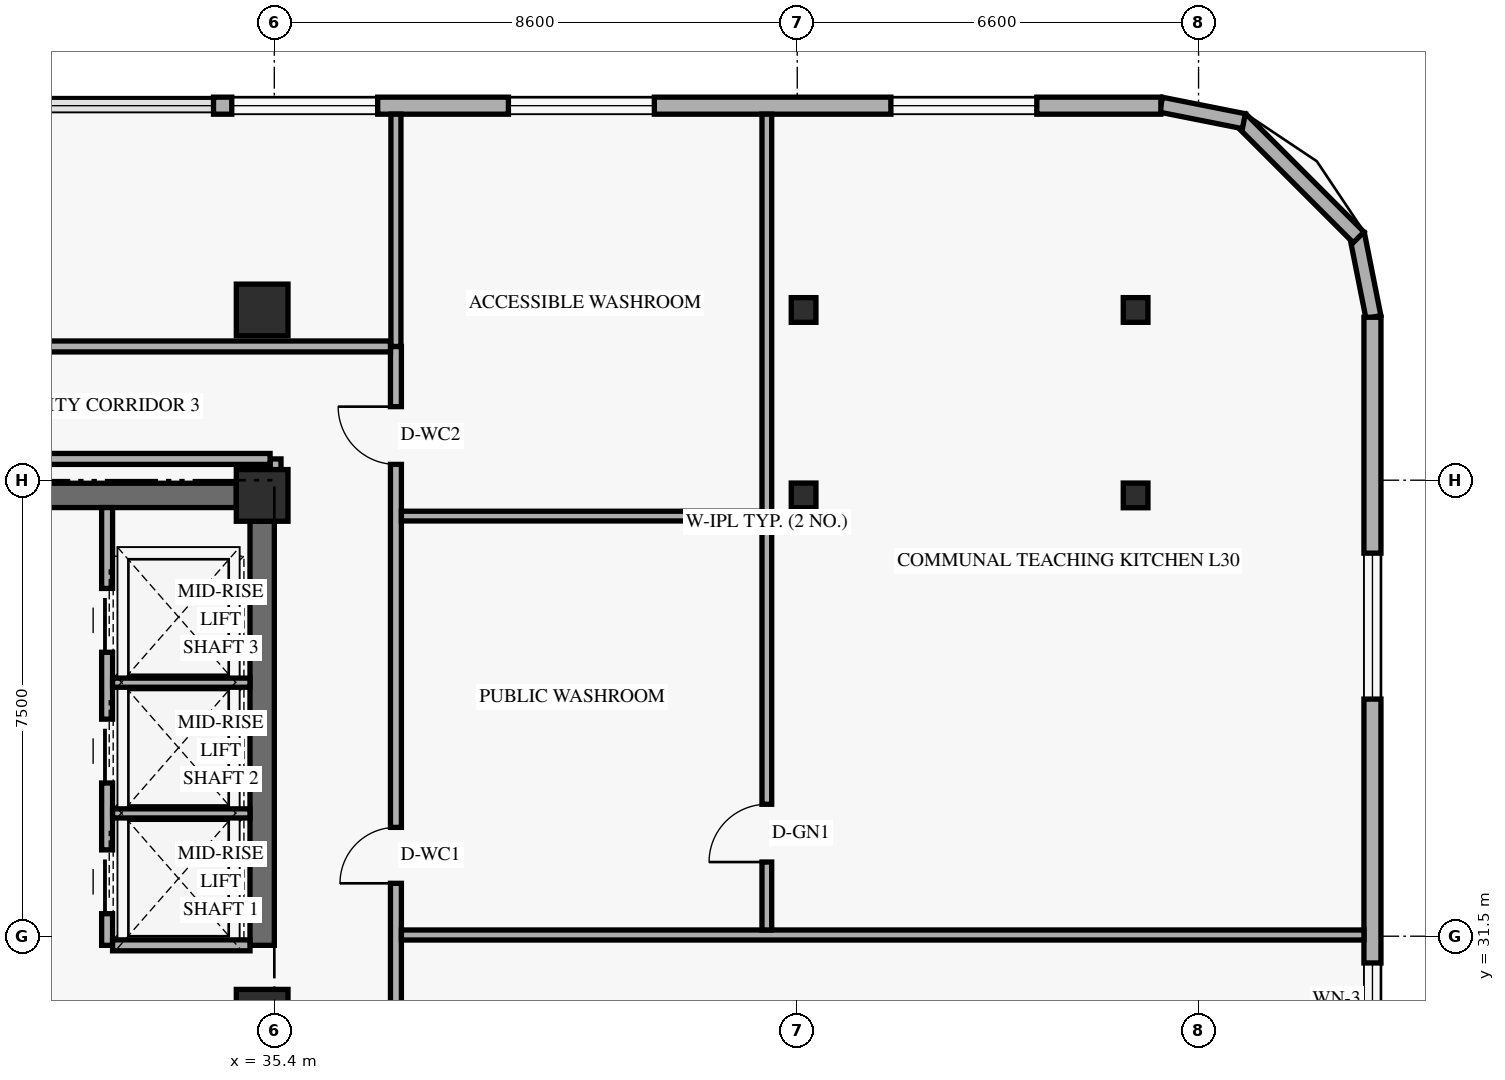
"""IFC4 building model, lengths in metres.
Left out: names, types, materials, properties, quantities, classifications, styles, units other than length and angle.
Written with IfcOpenShell. Run it as: python <this file> out.ifc"""

import sys

from ifc_helpers import new_model, si_unit, direction, frame, frame_2d, origin, origin_2d, place, context, subcontext, project, spatial, rectangle, hollow_rectangle, extrude, element, fill, save


model = new_model("IFC4")
c1 = context("Model", 3, precision=1e-05, world=origin(), true_north=direction((0.0, 1.0)))
c2 = subcontext(c1, "Body", "Model", "MODEL_VIEW")
j1 = project(units=[si_unit("LENGTHUNIT", "METRE"), si_unit("PLANEANGLEUNIT", "RADIAN")], contexts=[c1])
p1 = place(None, origin())
s1 = spatial("IfcSite", under=j1, at=p1, CompositionType="ELEMENT")
p2 = place(p1, origin())
s2 = spatial("IfcBuilding", under=s1, at=p2, CompositionType="ELEMENT")
p3 = place(p2, frame((0.0, 0.0, 117.0)))
s3 = spatial("IfcBuildingStorey", under=s2, at=p3, CompositionType="ELEMENT", Elevation=117.0)
p4 = place(p3, frame((35.2, 31.35, 0.0), z_axis=(0.0, 0.0, 1.0), x_axis=(0.0, 1.0, 0.0)))
e1 = element("IfcWall", 1, at=p4, inside=s3, PredefinedType="SHEAR", context=c2, shape_type="SweptSolid", body=[
    extrude(rectangle(XDim=6.975, YDim=0.4, at=frame_2d((3.487, 0.0))), origin(), (0.0, 0.0, 1.0), 3.349),
])
p5 = place(p3, frame((24.625, 38.75, 0.0), z_axis=(0.0, 0.0, 1.0), x_axis=(1.0, 0.0, 0.0)))
e2 = element("IfcWall", 2, at=p5, inside=s3, PredefinedType="SHEAR", context=c2, shape_type="SweptSolid", body=[
    extrude(rectangle(XDim=10.15, YDim=0.4, at=frame_2d((5.075, 0.0))), origin(), (0.0, 0.0, 1.0), 3.96),
])
for number, where, z_axis, x_axis in (
    (3, (35.2, 30.2, 0.0), (0.0, 0.0, 1.0), (1.0, 0.0, 0.0)),
    (4, (35.2, 38.75, 0.0), (0.0, 0.0, 1.0), (1.0, 0.0, 0.0)),
    (5, (35.2, 41.8, 0.0), (0.0, 0.0, 1.0), (1.0, 0.0, 0.0)),
):
    element("IfcColumn", number, at=place(p3, frame(where, z_axis=z_axis, x_axis=x_axis)), inside=s3, PredefinedType="COLUMN", context=c2, shape_type="SweptSolid", body=[
        extrude(rectangle(XDim=0.85, YDim=0.85, at=origin_2d()), origin(), (0.0, 0.0, 1.0), 4.2),
    ])
for number, where, z_axis, x_axis in (
    (6, (44.031, 38.75, 0.0), (0.035, 0.0, 0.999), (0.0, 1.0, 0.0)),
    (7, (44.031, 41.8, 0.0), (0.035, 0.0, 0.999), (0.0, 1.0, 0.0)),
):
    element("IfcColumn", number, at=place(p3, frame(where, z_axis=z_axis, x_axis=x_axis)), inside=s3, PredefinedType="COLUMN", context=c2, shape_type="SweptSolid", body=[
        extrude(hollow_rectangle(XDim=0.406, YDim=0.406, WallThickness=0.016, at=origin_2d()), origin(), (0.0, 0.0, 1.0), 4.203),
    ])
for number, where, z_axis, x_axis in (
    (8, (49.443, 38.75, 0.0), (0.058, 0.0, 0.998), (0.0, 1.0, 0.0)),
    (9, (49.443, 41.8, 0.0), (0.058, 0.0, 0.998), (0.0, 1.0, 0.0)),
):
    element("IfcColumn", number, at=place(p3, frame(where, z_axis=z_axis, x_axis=x_axis)), inside=s3, PredefinedType="COLUMN", context=c2, shape_type="SweptSolid", body=[
        extrude(hollow_rectangle(XDim=0.406, YDim=0.406, WallThickness=0.016, at=origin_2d()), origin(), (0.0, 0.0, 1.0), 4.207),
    ])
p6 = place(p3, frame((53.476, 41.684, 0.0), z_axis=(0.0, 0.0, 1.0), x_axis=(-0.195000137217, 0.980803214965, 0.0)))
e10 = element("IfcWall", 10, at=p6, inside=s3, PredefinedType="SOLIDWALL", context=c2, shape_type="SweptSolid", body=[
    extrude(rectangle(XDim=1.388, YDim=0.25, at=frame_2d((0.694, 0.0))), origin(), (0.0, 0.0, 1.0), 3.96),
])
p7 = place(p3, frame((53.232, 42.995, 0.0), z_axis=(0.0, 0.0, 1.0), x_axis=(-0.707151344399, 0.707062215165, 0.0)))
e11 = element("IfcWall", 11, at=p7, inside=s3, PredefinedType="SOLIDWALL", context=c2, shape_type="SweptSolid", body=[
    extrude(rectangle(XDim=2.739, YDim=0.25, at=frame_2d((1.37, 0.0))), origin(), (0.0, 0.0, 1.0), 3.96),
])
p8 = place(p3, frame((51.345, 44.905, 0.0), z_axis=(0.0, 0.0, 1.0), x_axis=(-0.980809899341, 0.19496651342, 0.0)))
e12 = element("IfcWall", 12, at=p8, inside=s3, PredefinedType="SOLIDWALL", context=c2, shape_type="SweptSolid", body=[
    extrude(rectangle(XDim=1.389, YDim=0.25, at=frame_2d((0.694, 0.0))), origin(), (0.0, 0.0, 1.0), 3.96),
])
p9 = place(p3, frame((53.46, 29.4, 0.0), z_axis=(0.0, 0.0, 1.0), x_axis=(0.0, 1.0, 0.0)))
e13 = element("IfcWall", 13, at=p9, inside=s3, PredefinedType="SOLIDWALL", context=c2, shape_type="SweptSolid", body=[
    extrude(rectangle(XDim=12.28, YDim=0.28, at=frame_2d((6.14, 0.0))), origin(), (0.0, 0.0, 1.0), 3.96),
])
p10 = place(p9, frame((0.46, 0.0, 0.85)))
e14 = element("IfcOpeningElement", 14, at=p10, cuts=e13, PredefinedType="OPENING", context=c2, shape_type="SweptSolid", body=[
    extrude(rectangle(XDim=1.2, YDim=1.5, at=frame_2d((0.6, 0.75))), frame((0.0, 0.15, 0.0), z_axis=(0.0, -1.0, 0.0), x_axis=(1.0, 0.0, 0.0)), (0.0, 0.0, 1.0), 0.3),
])
p11 = place(p9, frame((6.0, 0.0, 0.85)))
e15 = element("IfcOpeningElement", 15, at=p11, cuts=e13, PredefinedType="OPENING", context=c2, shape_type="SweptSolid", body=[
    extrude(rectangle(XDim=2.4, YDim=1.9, at=frame_2d((1.2, 0.95))), frame((0.0, 0.15, 0.0), z_axis=(0.0, -1.0, 0.0), x_axis=(1.0, 0.0, 0.0)), (0.0, 0.0, 1.0), 0.3),
])
p12 = place(p3, frame((49.98, 45.16, 0.0), z_axis=(0.0, 0.0, 1.0), x_axis=(-1.0, 0.0, 0.0)))
e16 = element("IfcWall", 16, at=p12, inside=s3, PredefinedType="SOLIDWALL", context=c2, shape_type="SweptSolid", body=[
    extrude(rectangle(XDim=15.58, YDim=0.28, at=frame_2d((7.79, 0.0))), origin(), (0.0, 0.0, 1.0), 3.96),
])
p13 = place(p12, frame((12.88, 0.0, 0.85)))
e17 = element("IfcOpeningElement", 17, at=p13, cuts=e16, PredefinedType="OPENING", context=c2, shape_type="SweptSolid", body=[
    extrude(rectangle(XDim=2.4, YDim=1.9, at=frame_2d((1.2, 0.95))), frame((0.0, 0.15, 0.0), z_axis=(0.0, -1.0, 0.0), x_axis=(1.0, 0.0, 0.0)), (0.0, 0.0, 1.0), 0.3),
])
p14 = place(p12, frame((8.33, 0.0, 0.85)))
e18 = element("IfcOpeningElement", 18, at=p14, cuts=e16, PredefinedType="OPENING", context=c2, shape_type="SweptSolid", body=[
    extrude(rectangle(XDim=2.4, YDim=1.9, at=frame_2d((1.2, 0.95))), frame((0.0, 0.15, 0.0), z_axis=(0.0, -1.0, 0.0), x_axis=(1.0, 0.0, 0.0)), (0.0, 0.0, 1.0), 0.3),
])
p15 = place(p12, frame((2.04, 0.0, 0.85)))
e19 = element("IfcOpeningElement", 19, at=p15, cuts=e16, PredefinedType="OPENING", context=c2, shape_type="SweptSolid", body=[
    extrude(rectangle(XDim=2.4, YDim=1.9, at=frame_2d((1.2, 0.95))), frame((0.0, 0.15, 0.0), z_axis=(0.0, -1.0, 0.0), x_axis=(1.0, 0.0, 0.0)), (0.0, 0.0, 1.0), 0.3),
])
p16 = place(p3, frame((32.65, 31.35, 0.0), z_axis=(0.0, 0.0, 1.0), x_axis=(0.0, 1.0, 0.0)))
e20 = element("IfcWall", 20, at=p16, inside=s3, PredefinedType="STANDARD", context=c2, shape_type="SweptSolid", body=[
    extrude(rectangle(XDim=7.2, YDim=0.18, at=frame_2d((3.6, 0.0))), origin(), (0.0, 0.0, 1.0), 3.96),
])
p17 = place(p16, frame((0.52, 0.0, 0.0)))
e21 = element("IfcOpeningElement", 21, at=p17, cuts=e20, PredefinedType="OPENING", context=c2, shape_type="SweptSolid", body=[
    extrude(rectangle(XDim=1.05, YDim=2.2, at=frame_2d((0.525, 1.1))), frame((0.0, 0.1, 0.0), z_axis=(0.0, -1.0, 0.0), x_axis=(1.0, 0.0, 0.0)), (0.0, 0.0, 1.0), 0.2),
])
p18 = place(p16, frame((2.67, 0.0, 0.0)))
e22 = element("IfcOpeningElement", 22, at=p18, cuts=e20, PredefinedType="OPENING", context=c2, shape_type="SweptSolid", body=[
    extrude(rectangle(XDim=1.05, YDim=2.2, at=frame_2d((0.525, 1.1))), frame((0.0, 0.1, 0.0), z_axis=(0.0, -1.0, 0.0), x_axis=(1.0, 0.0, 0.0)), (0.0, 0.0, 1.0), 0.2),
])
p19 = place(p16, frame((4.82, 0.0, 0.0)))
e23 = element("IfcOpeningElement", 23, at=p19, cuts=e20, PredefinedType="OPENING", context=c2, shape_type="SweptSolid", body=[
    extrude(rectangle(XDim=1.05, YDim=2.2, at=frame_2d((0.525, 1.1))), frame((0.0, 0.1, 0.0), z_axis=(0.0, -1.0, 0.0), x_axis=(1.0, 0.0, 0.0)), (0.0, 0.0, 1.0), 0.2),
])
p20 = place(p3, frame((32.74, 31.35, 0.0), z_axis=(0.0, 0.0, 1.0), x_axis=(1.0, 0.0, 0.0)))
e24 = element("IfcWall", 24, at=p20, inside=s3, PredefinedType="STANDARD", context=c2, shape_type="SweptSolid", body=[
    extrude(rectangle(XDim=2.26, YDim=0.18, at=frame_2d((1.13, 0.0))), origin(), (0.0, 0.0, 1.0), 3.96),
])
for number, where, z_axis, x_axis in (
    (25, (32.74, 33.52, 0.0), (0.0, 0.0, 1.0), (1.0, 0.0, 0.0)),
    (26, (32.74, 35.67, 0.0), (0.0, 0.0, 1.0), (1.0, 0.0, 0.0)),
):
    element("IfcWall", number, at=place(p3, frame(where, z_axis=z_axis, x_axis=x_axis)), inside=s3, PredefinedType="STANDARD", context=c2, shape_type="SweptSolid", body=[
        extrude(rectangle(XDim=2.26, YDim=0.15, at=frame_2d((1.13, 0.0))), origin(), (0.0, 0.0, 1.0), 3.96),
    ])
p21 = place(p3, frame((37.4, 6.8, 0.0), z_axis=(0.0, 0.0, 1.0), x_axis=(0.0, 1.0, 0.0)))
e27 = element("IfcWall", 27, at=p21, inside=s3, PredefinedType="STANDARD", context=c2, shape_type="SweptSolid", body=[
    extrude(rectangle(XDim=34.4, YDim=0.18, at=frame_2d((17.2, 0.0))), origin(), (0.0, 0.0, 1.0), 3.331),
])
p22 = place(p21, frame((25.57, 0.0, 0.0)))
e28 = element("IfcOpeningElement", 28, at=p22, cuts=e27, PredefinedType="OPENING", context=c2, shape_type="SweptSolid", body=[
    extrude(rectangle(XDim=0.92, YDim=2.14, at=frame_2d((0.46, 1.07))), frame((0.0, 0.1, 0.0), z_axis=(0.0, -1.0, 0.0), x_axis=(1.0, 0.0, 0.0)), (0.0, 0.0, 1.0), 0.2),
])
p23 = place(p21, frame((32.46, 0.0, 0.0)))
e29 = element("IfcOpeningElement", 29, at=p23, cuts=e27, PredefinedType="OPENING", context=c2, shape_type="SweptSolid", body=[
    extrude(rectangle(XDim=0.95, YDim=2.14, at=frame_2d((0.475, 1.07))), frame((0.0, 0.1, 0.0), z_axis=(0.0, -1.0, 0.0), x_axis=(1.0, 0.0, 0.0)), (0.0, 0.0, 1.0), 0.2),
])
p24 = place(p21, frame((2.8, 0.0, 0.0)))
e30 = element("IfcOpeningElement", 30, at=p24, cuts=e27, PredefinedType="OPENING", context=c2, shape_type="SweptSolid", body=[
    extrude(rectangle(XDim=1.15, YDim=2.15, at=frame_2d((0.575, 1.075))), frame((0.0, 0.1, 0.0), z_axis=(0.0, -1.0, 0.0), x_axis=(1.0, 0.0, 0.0)), (0.0, 0.0, 1.0), 0.2),
])
p25 = place(p21, frame((21.6, 0.0, 0.0)))
e31 = element("IfcOpeningElement", 31, at=p25, cuts=e27, PredefinedType="OPENING", context=c2, shape_type="SweptSolid", body=[
    extrude(rectangle(XDim=1.15, YDim=2.15, at=frame_2d((0.575, 1.075))), frame((0.0, 0.1, 0.0), z_axis=(0.0, -1.0, 0.0), x_axis=(1.0, 0.0, 0.0)), (0.0, 0.0, 1.0), 0.2),
])
p26 = place(p3, frame((37.4, 41.2, 0.0), z_axis=(0.0, 0.0, 1.0), x_axis=(0.0, 1.0, 0.0)))
e32 = element("IfcWall", 32, at=p26, inside=s3, PredefinedType="PARTITIONING", context=c2, shape_type="SweptSolid", body=[
    extrude(rectangle(XDim=3.82, YDim=0.165, at=frame_2d((1.91, 0.0))), origin(), (0.0, 0.0, 1.0), 3.409),
])
p27 = place(p3, frame((35.42, 38.75, 0.0), z_axis=(0.0, 0.0, 1.0), x_axis=(0.0, 1.0, 0.0)))
e33 = element("IfcWall", 33, at=p27, inside=s3, PredefinedType="STANDARD", context=c2, shape_type="SweptSolid", body=[
    extrude(rectangle(XDim=0.6, YDim=0.18, at=frame_2d((0.3, 0.0))), origin(), (0.0, 0.0, 1.0), 3.331),
])
p28 = place(p3, frame((37.49, 31.52, 0.0), z_axis=(0.0, 0.0, 1.0), x_axis=(1.0, 0.0, 0.0)))
e34 = element("IfcWall", 34, at=p28, inside=s3, PredefinedType="PARTITIONING", context=c2, shape_type="SweptSolid", body=[
    extrude(rectangle(XDim=15.83, YDim=0.165, at=frame_2d((7.915, 0.0))), origin(), (0.0, 0.0, 1.0), 3.331),
])
p29 = place(p3, frame((43.5, 31.603, 0.0), z_axis=(0.0, 0.0, 1.0), x_axis=(0.0, 1.0, 0.0)))
e35 = element("IfcWall", 35, at=p29, inside=s3, PredefinedType="PLUMBINGWALL", context=c2, shape_type="SweptSolid", body=[
    extrude(rectangle(XDim=13.417, YDim=0.16, at=frame_2d((6.709, 0.0))), origin(), (0.0, 0.0, 1.0), 3.331),
])
p30 = place(p29, frame((1.117, 0.0, 0.0)))
e36 = element("IfcOpeningElement", 36, at=p30, cuts=e35, PredefinedType="OPENING", context=c2, shape_type="SweptSolid", body=[
    extrude(rectangle(XDim=0.95, YDim=2.15, at=frame_2d((0.475, 1.075))), frame((0.0, 0.09, 0.0), z_axis=(0.0, -1.0, 0.0), x_axis=(1.0, 0.0, 0.0)), (0.0, 0.0, 1.0), 0.18),
])
p31 = place(p3, frame((37.49, 38.41, 0.0), z_axis=(0.0, 0.0, 1.0), x_axis=(1.0, 0.0, 0.0)))
e37 = element("IfcWall", 37, at=p31, inside=s3, PredefinedType="PLUMBINGWALL", context=c2, shape_type="SweptSolid", body=[
    extrude(rectangle(XDim=5.93, YDim=0.16, at=frame_2d((2.965, 0.0))), origin(), (0.0, 0.0, 1.0), 3.96),
])
p32 = place(p3, frame((21.74, 41.2, 0.0), z_axis=(0.0, 0.0, 1.0), x_axis=(1.0, 0.0, 0.0)))
e38 = element("IfcWall", 38, at=p32, inside=s3, PredefinedType="STANDARD", context=c2, shape_type="SweptSolid", body=[
    extrude(rectangle(XDim=15.57, YDim=0.18, at=frame_2d((7.785, 0.0))), origin(), (0.0, 0.0, 1.0), 3.331),
])
p33 = place(p32, frame((5.41, 0.0, 0.0)))
e39 = element("IfcOpeningElement", 39, at=p33, cuts=e38, PredefinedType="OPENING", context=c2, shape_type="SweptSolid", body=[
    extrude(rectangle(XDim=0.95, YDim=2.15, at=frame_2d((0.475, 1.075))), frame((0.0, 0.1, 0.0), z_axis=(0.0, -1.0, 0.0), x_axis=(1.0, 0.0, 0.0)), (0.0, 0.0, 1.0), 0.2),
])
p34 = place(p3, frame((23.85, 39.35, 0.0), z_axis=(0.0, 0.0, 1.0), x_axis=(1.0, 0.0, 0.0)))
e40 = element("IfcWall", 40, at=p34, inside=s3, PredefinedType="STANDARD", context=c2, shape_type="SweptSolid", body=[
    extrude(rectangle(XDim=11.48, YDim=0.18, at=frame_2d((5.74, 0.0))), origin(), (0.0, 0.0, 1.0), 3.331),
])
p35 = place(p10, origin())
e41 = element("IfcWindow", 41, at=p35, inside=s3, PartitioningType="SINGLE_PANEL", PredefinedType="WINDOW", context=c2, shape_type="SweptSolid", body=[
    extrude(rectangle(XDim=1.2, YDim=1.5, at=frame_2d((0.6, 0.75))), frame((0.0, 0.03, 0.0), z_axis=(0.0, -1.0, 0.0), x_axis=(1.0, 0.0, 0.0)), (0.0, 0.0, 1.0), 0.06),
])
fill(e14, e41)
p36 = place(p11, origin())
e42 = element("IfcWindow", 42, at=p36, inside=s3, PartitioningType="SINGLE_PANEL", PredefinedType="WINDOW", context=c2, shape_type="SweptSolid", body=[
    extrude(rectangle(XDim=2.4, YDim=1.9, at=frame_2d((1.2, 0.95))), frame((0.0, 0.03, 0.0), z_axis=(0.0, -1.0, 0.0), x_axis=(1.0, 0.0, 0.0)), (0.0, 0.0, 1.0), 0.06),
])
fill(e15, e42)
p37 = place(p13, origin())
e43 = element("IfcWindow", 43, at=p37, inside=s3, PartitioningType="SINGLE_PANEL", PredefinedType="WINDOW", context=c2, shape_type="SweptSolid", body=[
    extrude(rectangle(XDim=2.4, YDim=1.9, at=frame_2d((1.2, 0.95))), frame((0.0, 0.03, 0.0), z_axis=(0.0, -1.0, 0.0), x_axis=(1.0, 0.0, 0.0)), (0.0, 0.0, 1.0), 0.06),
])
fill(e17, e43)
p38 = place(p14, origin())
e44 = element("IfcWindow", 44, at=p38, inside=s3, PartitioningType="SINGLE_PANEL", PredefinedType="WINDOW", context=c2, shape_type="SweptSolid", body=[
    extrude(rectangle(XDim=2.4, YDim=1.9, at=frame_2d((1.2, 0.95))), frame((0.0, 0.03, 0.0), z_axis=(0.0, -1.0, 0.0), x_axis=(1.0, 0.0, 0.0)), (0.0, 0.0, 1.0), 0.06),
])
fill(e18, e44)
p39 = place(p15, origin())
e45 = element("IfcWindow", 45, at=p39, inside=s3, PartitioningType="SINGLE_PANEL", PredefinedType="WINDOW", context=c2, shape_type="SweptSolid", body=[
    extrude(rectangle(XDim=2.4, YDim=1.9, at=frame_2d((1.2, 0.95))), frame((0.0, 0.03, 0.0), z_axis=(0.0, -1.0, 0.0), x_axis=(1.0, 0.0, 0.0)), (0.0, 0.0, 1.0), 0.06),
])
fill(e19, e45)
p40 = place(p17, origin())
e46 = element("IfcDoor", 46, at=p40, inside=s3, OperationType="SLIDING_TO_LEFT", PredefinedType="DOOR", context=c2, shape_type="SweptSolid", body=[
    extrude(rectangle(XDim=1.05, YDim=2.2, at=frame_2d((0.525, 1.1))), frame((0.0, 0.025, 0.0), z_axis=(0.0, -1.0, 0.0), x_axis=(1.0, 0.0, 0.0)), (0.0, 0.0, 1.0), 0.05),
])
fill(e21, e46)
p41 = place(p18, origin())
e47 = element("IfcDoor", 47, at=p41, inside=s3, OperationType="SLIDING_TO_LEFT", PredefinedType="DOOR", context=c2, shape_type="SweptSolid", body=[
    extrude(rectangle(XDim=1.05, YDim=2.2, at=frame_2d((0.525, 1.1))), frame((0.0, 0.025, 0.0), z_axis=(0.0, -1.0, 0.0), x_axis=(1.0, 0.0, 0.0)), (0.0, 0.0, 1.0), 0.05),
])
fill(e22, e47)
p42 = place(p19, origin())
e48 = element("IfcDoor", 48, at=p42, inside=s3, OperationType="SLIDING_TO_LEFT", PredefinedType="DOOR", context=c2, shape_type="SweptSolid", body=[
    extrude(rectangle(XDim=1.05, YDim=2.2, at=frame_2d((0.525, 1.1))), frame((0.0, 0.025, 0.0), z_axis=(0.0, -1.0, 0.0), x_axis=(1.0, 0.0, 0.0)), (0.0, 0.0, 1.0), 0.05),
])
fill(e23, e48)
p43 = place(p22, origin())
e49 = element("IfcDoor", 49, at=p43, inside=s3, OperationType="SINGLE_SWING_LEFT", PredefinedType="DOOR", context=c2, shape_type="SweptSolid", body=[
    extrude(rectangle(XDim=0.92, YDim=2.14, at=frame_2d((0.46, 1.07))), frame((0.0, 0.025, 0.0), z_axis=(0.0, -1.0, 0.0), x_axis=(1.0, 0.0, 0.0)), (0.0, 0.0, 1.0), 0.05),
])
fill(e28, e49)
p44 = place(p23, origin())
e50 = element("IfcDoor", 50, at=p44, inside=s3, OperationType="SINGLE_SWING_RIGHT", PredefinedType="DOOR", context=c2, shape_type="SweptSolid", body=[
    extrude(rectangle(XDim=0.95, YDim=2.14, at=frame_2d((0.475, 1.07))), frame((0.0, 0.025, 0.0), z_axis=(0.0, -1.0, 0.0), x_axis=(1.0, 0.0, 0.0)), (0.0, 0.0, 1.0), 0.05),
])
fill(e29, e50)
p45 = place(p30, origin())
e51 = element("IfcDoor", 51, at=p45, inside=s3, OperationType="SINGLE_SWING_LEFT", PredefinedType="DOOR", context=c2, shape_type="SweptSolid", body=[
    extrude(rectangle(XDim=0.95, YDim=2.15, at=frame_2d((0.475, 1.075))), frame((0.0, 0.025, 0.0), z_axis=(0.0, -1.0, 0.0), x_axis=(1.0, 0.0, 0.0)), (0.0, 0.0, 1.0), 0.05),
])
fill(e36, e51)
save(model, sys.argv[1])
